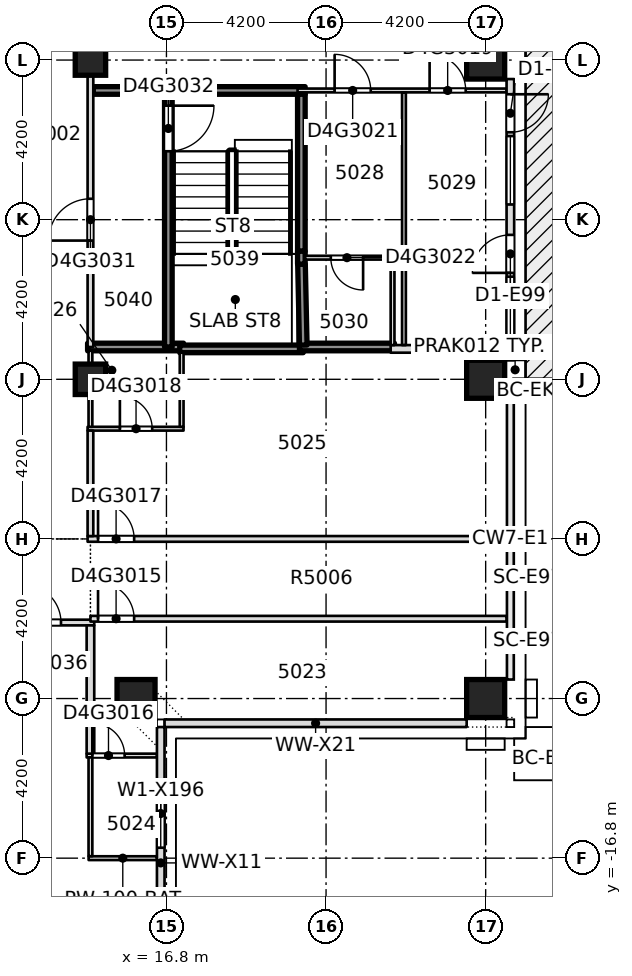
"""IFC4 building model, lengths in metres.
Left out: names, types, materials, properties, quantities, classifications, styles, units other than length and angle.
Written with IfcOpenShell. Run it as: python <this file> out.ifc"""

import sys

from ifc_helpers import new_model, si_unit, direction, frame, frame_2d, origin, origin_2d, place, context, subcontext, project, spatial, rectangle, extrude, element, fill, save


model = new_model("IFC4")
c1 = context("Model", 3, precision=1e-05, world=origin(), true_north=direction((0.0, 1.0)))
c2 = subcontext(c1, "Body", "Model", "MODEL_VIEW")
j1 = project(units=[si_unit("LENGTHUNIT", "METRE"), si_unit("PLANEANGLEUNIT", "RADIAN")], contexts=[c1])
p1 = place(None, origin())
s1 = spatial("IfcSite", under=j1, at=p1, CompositionType="ELEMENT")
p2 = place(p1, origin())
s2 = spatial("IfcBuilding", under=s1, at=p2, CompositionType="ELEMENT")
p3 = place(p2, frame((0.0, 0.0, 192.8)))
s3 = spatial("IfcBuildingStorey", under=s2, at=p3, CompositionType="ELEMENT", Elevation=192.8)
for number, where, z_axis, x_axis in (
    (1, (16.0, -12.6, -0.4), (0.0, 0.0, 1.0), (1.0, 0.0, 0.0)),
    (2, (25.2, -12.6, -0.4), (0.0, 0.0, 1.0), (1.0, 0.0, 0.0)),
    (3, (25.2, -4.2, -0.4), (0.0, 0.0, 1.0), (1.0, 0.0, 0.0)),
    (4, (25.2, 4.2, -0.4), (0.0, 0.0, 1.0), (1.0, 0.0, 0.0)),
):
    element("IfcColumn", number, at=place(p3, frame(where, z_axis=z_axis, x_axis=x_axis)), inside=s3, PredefinedType="COLUMN", context=c2, shape_type="SweptSolid", body=[
        extrude(rectangle(XDim=1.0, YDim=1.0, at=origin_2d()), origin(), (0.0, 0.0, 1.0), 3.45),
    ])
for number, where, z_axis, x_axis in (
    (5, (14.8, -4.2, -0.4), (0.0, 0.0, 1.0), (1.0, 0.0, 0.0)),
    (6, (14.8, 4.2, -0.4), (0.0, 0.0, 1.0), (1.0, 0.0, 0.0)),
):
    element("IfcColumn", number, at=place(p3, frame(where, z_axis=z_axis, x_axis=x_axis)), inside=s3, PredefinedType="COLUMN", context=c2, shape_type="SweptSolid", body=[
        extrude(rectangle(XDim=0.8, YDim=0.8, at=origin_2d()), origin(), (0.0, 0.0, 1.0), 3.45),
    ])
p4 = place(p3, frame((14.752, -16.8, 0.0), z_axis=(0.0, 0.0, 1.0), x_axis=(1.0, 0.0, 0.0)))
e7 = element("IfcWall", 7, at=p4, inside=s3, PredefinedType="PARTITIONING", context=c2, shape_type="SweptSolid", body=[
    extrude(rectangle(XDim=1.798, YDim=0.1, at=frame_2d((0.899, 0.0))), origin(), (0.0, 0.0, 1.0), 3.05),
])
p5 = place(p3, frame((14.7, -14.1, 0.0), z_axis=(0.0, 0.0, 1.0), x_axis=(1.0, 0.0, 0.0)))
e8 = element("IfcWall", 8, at=p5, inside=s3, PredefinedType="PARTITIONING", context=c2, shape_type="SweptSolid", body=[
    extrude(rectangle(XDim=1.85, YDim=0.1, at=frame_2d((0.925, 0.0))), origin(), (0.0, 0.0, 1.0), 3.05),
])
p6 = place(p5, frame((0.15, 0.0, 0.0)))
e9 = element("IfcOpeningElement", 9, at=p6, cuts=e8, PredefinedType="OPENING", context=c2, shape_type="SweptSolid", body=[
    extrude(rectangle(XDim=0.85, YDim=2.1, at=frame_2d((0.425, 1.05))), frame((0.0, 0.06, 0.0), z_axis=(0.0, -1.0, 0.0), x_axis=(1.0, 0.0, 0.0)), (0.0, 0.0, 1.0), 0.12),
])
p7 = place(p3, frame((3.9, -10.6, 0.0), z_axis=(0.0, 0.0, 1.0), x_axis=(1.0, 0.0, 0.0)))
e10 = element("IfcWall", 10, at=p7, inside=s3, PredefinedType="PARTITIONING", context=c2, shape_type="SweptSolid", body=[
    extrude(rectangle(XDim=11.0, YDim=0.15, at=frame_2d((5.5, 0.0))), origin(), (0.0, 0.0, 1.0), 3.05),
])
p8 = place(p7, frame((1.875, 0.0, 0.0)))
e11 = element("IfcOpeningElement", 11, at=p8, cuts=e10, PredefinedType="OPENING", context=c2, shape_type="SweptSolid", body=[
    extrude(rectangle(XDim=0.95, YDim=2.1, at=frame_2d((0.475, 1.05))), frame((0.0, 0.085, 0.0), z_axis=(0.0, -1.0, 0.0), x_axis=(1.0, 0.0, 0.0)), (0.0, 0.0, 1.0), 0.17),
])
p9 = place(p7, frame((5.95, 0.0, 0.0)))
e12 = element("IfcOpeningElement", 12, at=p9, cuts=e10, PredefinedType="OPENING", context=c2, shape_type="SweptSolid", body=[
    extrude(rectangle(XDim=1.1, YDim=2.1, at=frame_2d((0.55, 1.05))), frame((0.0, 0.085, 0.0), z_axis=(0.0, -1.0, 0.0), x_axis=(1.0, 0.0, 0.0)), (0.0, 0.0, 1.0), 0.17),
])
p10 = place(p7, frame((9.125, 0.0, 0.0)))
e13 = element("IfcOpeningElement", 13, at=p10, cuts=e10, PredefinedType="OPENING", context=c2, shape_type="SweptSolid", body=[
    extrude(rectangle(XDim=1.0, YDim=2.1, at=frame_2d((0.5, 1.05))), frame((0.0, 0.085, 0.0), z_axis=(0.0, -1.0, 0.0), x_axis=(1.0, 0.0, 0.0)), (0.0, 0.0, 1.0), 0.17),
])
p11 = place(p3, frame((14.8, -10.5, 0.0), z_axis=(0.0, 0.0, 1.0), x_axis=(1.0, 0.0, 0.0)))
e14 = element("IfcWall", 14, at=p11, inside=s3, PredefinedType="PARTITIONING", context=c2, shape_type="SweptSolid", body=[
    extrude(rectangle(XDim=10.95, YDim=0.15, at=frame_2d((5.475, 0.0))), origin(), (0.0, 0.0, 1.0), 3.05),
])
p12 = place(p11, frame((0.2, 0.0, 0.0)))
e15 = element("IfcOpeningElement", 15, at=p12, cuts=e14, PredefinedType="OPENING", context=c2, shape_type="SweptSolid", body=[
    extrude(rectangle(XDim=0.95, YDim=2.1, at=frame_2d((0.475, 1.05))), frame((0.0, 0.085, 0.0), z_axis=(0.0, -1.0, 0.0), x_axis=(1.0, 0.0, 0.0)), (0.0, 0.0, 1.0), 0.17),
])
p13 = place(p3, frame((14.725, -8.4, 0.0), z_axis=(0.0, 0.0, 1.0), x_axis=(1.0, 0.0, 0.0)))
e16 = element("IfcWall", 16, at=p13, inside=s3, PredefinedType="PARTITIONING", context=c2, shape_type="SweptSolid", body=[
    extrude(rectangle(XDim=11.025, YDim=0.15, at=frame_2d((5.512, 0.0))), origin(), (0.0, 0.0, 1.0), 3.05),
])
p14 = place(p13, frame((0.275, 0.0, 0.0)))
e17 = element("IfcOpeningElement", 17, at=p14, cuts=e16, PredefinedType="OPENING", context=c2, shape_type="SweptSolid", body=[
    extrude(rectangle(XDim=0.95, YDim=2.1, at=frame_2d((0.475, 1.05))), frame((0.0, 0.085, 0.0), z_axis=(0.0, -1.0, 0.0), x_axis=(1.0, 0.0, 0.0)), (0.0, 0.0, 1.0), 0.17),
])
p15 = place(p3, frame((14.725, -5.5, 0.0), z_axis=(0.0, 0.0, 1.0), x_axis=(1.0, 0.0, 0.0)))
e18 = element("IfcWall", 18, at=p15, inside=s3, PredefinedType="PARTITIONING", context=c2, shape_type="SweptSolid", body=[
    extrude(rectangle(XDim=2.525, YDim=0.1, at=frame_2d((1.262, 0.0))), origin(), (0.0, 0.0, 1.0), 3.05),
])
p16 = place(p15, frame((0.85, 0.0, 0.0)))
e19 = element("IfcOpeningElement", 19, at=p16, cuts=e18, PredefinedType="OPENING", context=c2, shape_type="SweptSolid", body=[
    extrude(rectangle(XDim=0.85, YDim=2.1, at=frame_2d((0.425, 1.05))), frame((0.0, 0.06, 0.0), z_axis=(0.0, -1.0, 0.0), x_axis=(1.0, 0.0, 0.0)), (0.0, 0.0, 1.0), 0.12),
])
p17 = place(p3, frame((14.725, -3.35, 0.0), z_axis=(0.0, 0.0, 1.0), x_axis=(1.0, 0.0, 0.0)))
e20 = element("IfcWall", 20, at=p17, inside=s3, PredefinedType="SOLIDWALL", context=c2, shape_type="SweptSolid", body=[
    extrude(rectangle(XDim=2.525, YDim=0.2, at=frame_2d((1.262, 0.0))), origin(), (0.0, 0.0, 1.0), 3.05),
])
p18 = place(p3, frame((17.15, -3.4, 0.0), z_axis=(0.0, 0.0, 1.0), x_axis=(1.0, 0.0, 0.0)))
e21 = element("IfcWall", 21, at=p18, inside=s3, PredefinedType="SOLIDWALL", context=c2, shape_type="SweptSolid", body=[
    extrude(rectangle(XDim=3.25, YDim=0.2, at=frame_2d((1.625, 0.0))), origin(), (0.0, 0.0, 1.0), 3.05),
])
p19 = place(p3, frame((20.3, -3.35, 0.0), z_axis=(0.0, 0.0, 1.0), x_axis=(1.0, 0.0, 0.0)))
e22 = element("IfcWall", 22, at=p19, inside=s3, PredefinedType="SOLIDWALL", context=c2, shape_type="SweptSolid", body=[
    extrude(rectangle(XDim=2.5, YDim=0.2, at=frame_2d((1.25, 0.0))), origin(), (0.0, 0.0, 1.0), 3.05),
])
p20 = place(p3, frame((22.7, -3.4, 0.0), z_axis=(0.0, 0.0, 1.0), x_axis=(1.0, 0.0, 0.0)))
e23 = element("IfcWall", 23, at=p20, inside=s3, PredefinedType="PARTITIONING", context=c2, shape_type="SweptSolid", body=[
    extrude(rectangle(XDim=3.05, YDim=0.2, at=frame_2d((1.525, 0.0))), origin(), (0.0, 0.0, 1.0), 3.05),
])
p21 = place(p3, frame((20.45, -1.0, 0.0), z_axis=(0.0, 0.0, 1.0), x_axis=(1.0, 0.0, 0.0)))
e24 = element("IfcWall", 24, at=p21, inside=s3, PredefinedType="PARTITIONING", context=c2, shape_type="SweptSolid", body=[
    extrude(rectangle(XDim=2.35, YDim=0.1, at=frame_2d((1.175, 0.0))), origin(), (0.0, 0.0, 1.0), 3.05),
])
p22 = place(p21, frame((0.675, 0.0, 0.0)))
e25 = element("IfcOpeningElement", 25, at=p22, cuts=e24, PredefinedType="OPENING", context=c2, shape_type="SweptSolid", body=[
    extrude(rectangle(XDim=0.85, YDim=2.1, at=frame_2d((0.425, 1.05))), frame((0.0, 0.06, 0.0), z_axis=(0.0, -1.0, 0.0), x_axis=(1.0, 0.0, 0.0)), (0.0, 0.0, 1.0), 0.12),
])
p23 = place(p3, frame((14.875, 3.4, 0.0), z_axis=(0.0, 0.0, 1.0), x_axis=(1.0, 0.0, 0.0)))
e26 = element("IfcWall", 26, at=p23, inside=s3, PredefinedType="SOLIDWALL", context=c2, shape_type="SweptSolid", body=[
    extrude(rectangle(XDim=5.575, YDim=0.2, at=frame_2d((2.788, 0.0))), origin(), (0.0, 0.0, 1.0), 3.05),
])
p24 = place(p3, frame((20.25, 3.4, 0.0), z_axis=(0.0, 0.0, 1.0), x_axis=(1.0, 0.0, 0.0)))
e27 = element("IfcWall", 27, at=p24, inside=s3, PredefinedType="PARTITIONING", context=c2, shape_type="SweptSolid", body=[
    extrude(rectangle(XDim=5.5, YDim=0.1, at=frame_2d((2.75, 0.0))), origin(), (0.0, 0.0, 1.0), 3.05),
])
p25 = place(p24, frame((3.475, 0.0, 0.0)))
e28 = element("IfcOpeningElement", 28, at=p25, cuts=e27, PredefinedType="OPENING", context=c2, shape_type="SweptSolid", body=[
    extrude(rectangle(XDim=0.95, YDim=2.1, at=frame_2d((0.475, 1.05))), frame((0.0, 0.06, 0.0), z_axis=(0.0, -1.0, 0.0), x_axis=(1.0, 0.0, 0.0)), (0.0, 0.0, 1.0), 0.12),
])
p26 = place(p24, frame((0.975, 0.0, 0.0)))
e29 = element("IfcOpeningElement", 29, at=p26, cuts=e27, PredefinedType="OPENING", context=c2, shape_type="SweptSolid", body=[
    extrude(rectangle(XDim=0.95, YDim=2.1, at=frame_2d((0.475, 1.05))), frame((0.0, 0.06, 0.0), z_axis=(0.0, -1.0, 0.0), x_axis=(1.0, 0.0, 0.0)), (0.0, 0.0, 1.0), 0.12),
])
p27 = place(p3, frame((14.8, -16.748, 0.0), z_axis=(0.0, 0.0, 1.0), x_axis=(0.0, 1.0, 0.0)))
e30 = element("IfcWall", 30, at=p27, inside=s3, PredefinedType="PARTITIONING", context=c2, shape_type="SweptSolid", body=[
    extrude(rectangle(XDim=2.598, YDim=0.1, at=frame_2d((1.299, 0.0))), origin(), (0.0, 0.0, 1.0), 3.05),
])
p28 = place(p3, frame((14.8, -14.05, 0.0), z_axis=(0.0, 0.0, 1.0), x_axis=(0.0, 1.0, 0.0)))
e31 = element("IfcWall", 31, at=p28, inside=s3, PredefinedType="PARTITIONING", context=c2, shape_type="SweptSolid", body=[
    extrude(rectangle(XDim=3.375, YDim=0.2, at=frame_2d((1.688, 0.0))), origin(), (0.0, 0.0, 1.0), 3.05),
])
p29 = place(p3, frame((14.8, -8.325, 0.0), z_axis=(0.0, 0.0, 1.0), x_axis=(0.0, 1.0, 0.0)))
e32 = element("IfcWall", 32, at=p29, inside=s3, PredefinedType="PARTITIONING", context=c2, shape_type="SweptSolid", body=[
    extrude(rectangle(XDim=2.775, YDim=0.15, at=frame_2d((1.387, 0.0))), origin(), (0.0, 0.0, 1.0), 3.05),
])
p30 = place(p3, frame((14.8, -5.45, 0.0), z_axis=(0.0, 0.0, 1.0), x_axis=(0.0, 1.0, 0.0)))
e33 = element("IfcWall", 33, at=p30, inside=s3, PredefinedType="PARTITIONING", context=c2, shape_type="SweptSolid", body=[
    extrude(rectangle(XDim=2.0, YDim=0.1, at=frame_2d((1.0, 0.0))), origin(), (0.0, 0.0, 1.0), 3.05),
])
p31 = place(p3, frame((14.8, -3.35, 0.0), z_axis=(0.0, 0.0, 1.0), x_axis=(0.0, 1.0, 0.0)))
e34 = element("IfcWall", 34, at=p31, inside=s3, PredefinedType="PARTITIONING", context=c2, shape_type="SweptSolid", body=[
    extrude(rectangle(XDim=11.675, YDim=0.15, at=frame_2d((5.837, 0.0))), origin(), (0.0, 0.0, 1.0), 3.05),
])
p32 = place(p31, frame((2.8, 0.0, 0.0)))
e35 = element("IfcOpeningElement", 35, at=p32, cuts=e34, PredefinedType="OPENING", context=c2, shape_type="SweptSolid", body=[
    extrude(rectangle(XDim=1.1, YDim=2.1, at=frame_2d((0.55, 1.05))), frame((0.0, 0.085, 0.0), z_axis=(0.0, -1.0, 0.0), x_axis=(1.0, 0.0, 0.0)), (0.0, 0.0, 1.0), 0.17),
])
p33 = place(p3, frame((16.85, -3.35, 0.0), z_axis=(0.0, 0.0, 1.0), x_axis=(0.0, 1.0, 0.0)))
e36 = element("IfcWall", 36, at=p33, inside=s3, PredefinedType="SOLIDWALL", context=c2, shape_type="SweptSolid", body=[
    extrude(rectangle(XDim=6.65, YDim=0.2, at=frame_2d((3.325, 0.0))), origin(), (0.0, 0.0, 1.0), 3.05),
])
p34 = place(p33, frame((5.15, 0.0, 0.0)))
e37 = element("IfcOpeningElement", 37, at=p34, cuts=e36, PredefinedType="OPENING", context=c2, shape_type="SweptSolid", body=[
    extrude(rectangle(XDim=1.2, YDim=2.1, at=frame_2d((0.6, 1.05))), frame((0.0, 0.11, 0.0), z_axis=(0.0, -1.0, 0.0), x_axis=(1.0, 0.0, 0.0)), (0.0, 0.0, 1.0), 0.22),
])
p35 = place(p3, frame((17.2, -5.45, 0.0), z_axis=(0.0, 0.0, 1.0), x_axis=(0.0, 1.0, 0.0)))
e38 = element("IfcWall", 38, at=p35, inside=s3, PredefinedType="PARTITIONING", context=c2, shape_type="SweptSolid", body=[
    extrude(rectangle(XDim=1.95, YDim=0.1, at=frame_2d((0.975, 0.0))), origin(), (0.0, 0.0, 1.0), 3.05),
])
p36 = place(p3, frame((20.4, -3.3, 0.0), z_axis=(0.0, 0.0, 1.0), x_axis=(-0.021771342749, 0.999762976227, 0.0)))
e39 = element("IfcWall", 39, at=p36, inside=s3, PredefinedType="SOLIDWALL", context=c2, shape_type="SweptSolid", body=[
    extrude(rectangle(XDim=2.131, YDim=0.2, at=frame_2d((1.065, 0.0))), origin(), (0.0, 0.0, 1.0), 3.05),
])
p37 = place(p3, frame((20.35, -0.83, 0.0), z_axis=(0.0, 0.0, 1.0), x_axis=(0.0, 1.0, 0.0)))
e40 = element("IfcWall", 40, at=p37, inside=s3, PredefinedType="SOLIDWALL", context=c2, shape_type="SweptSolid", body=[
    extrude(rectangle(XDim=4.13, YDim=0.2, at=frame_2d((2.065, 0.0))), origin(), (0.0, 0.0, 1.0), 3.05),
])
p38 = place(p3, frame((22.75, -3.3, 0.0), z_axis=(0.0, 0.0, 1.0), x_axis=(0.0, 1.0, 0.0)))
e41 = element("IfcWall", 41, at=p38, inside=s3, PredefinedType="PARTITIONING", context=c2, shape_type="SweptSolid", body=[
    extrude(rectangle(XDim=2.25, YDim=0.1, at=frame_2d((1.125, 0.0))), origin(), (0.0, 0.0, 1.0), 3.05),
])
p39 = place(p3, frame((23.05, -3.3, 0.0), z_axis=(0.0, 0.0, 1.0), x_axis=(0.0, 1.0, 0.0)))
e42 = element("IfcWall", 42, at=p39, inside=s3, PredefinedType="PARTITIONING", context=c2, shape_type="SweptSolid", body=[
    extrude(rectangle(XDim=6.65, YDim=0.1, at=frame_2d((3.325, 0.0))), origin(), (0.0, 0.0, 1.0), 3.05),
])
p40 = place(p3, frame((16.65, -20.5, 0.0), z_axis=(0.0, 0.0, 1.0), x_axis=(0.0, 1.0, 0.0)))
e43 = element("IfcWall", 43, at=p40, inside=s3, PredefinedType="STANDARD", context=c2, shape_type="SweptSolid", body=[
    extrude(rectangle(XDim=7.15, YDim=0.2, at=frame_2d((3.575, 0.0))), origin(), (0.0, 0.0, 1.0), 3.05),
])
p41 = place(p40, frame((0.4, 0.0, 0.2)))
e44 = element("IfcOpeningElement", 44, at=p41, cuts=e43, PredefinedType="OPENING", context=c2, shape_type="SweptSolid", body=[
    extrude(rectangle(XDim=1.8, YDim=2.65, at=frame_2d((0.9, 1.325))), frame((0.0, 0.11, 0.0), z_axis=(0.0, -1.0, 0.0), x_axis=(1.0, 0.0, 0.0)), (0.0, 0.0, 1.0), 0.22),
])
p42 = place(p40, frame((3.975, 0.0, 0.2)))
e45 = element("IfcOpeningElement", 45, at=p42, cuts=e43, PredefinedType="OPENING", context=c2, shape_type="SweptSolid", body=[
    extrude(rectangle(XDim=1.8, YDim=2.65, at=frame_2d((0.9, 1.325))), frame((0.0, 0.11, 0.0), z_axis=(0.0, -1.0, 0.0), x_axis=(1.0, 0.0, 0.0)), (0.0, 0.0, 1.0), 0.22),
])
p43 = place(p3, frame((16.75, -13.25, 0.0), z_axis=(0.0, 0.0, 1.0), x_axis=(1.0, 0.0, 0.0)))
e46 = element("IfcWall", 46, at=p43, inside=s3, PredefinedType="STANDARD", context=c2, shape_type="SweptSolid", body=[
    extrude(rectangle(XDim=7.95, YDim=0.2, at=frame_2d((3.975, 0.0))), origin(), (0.0, 0.0, 1.0), 3.05),
])
p44 = place(p3, frame((25.85, -3.7, 0.0), z_axis=(0.0, 0.0, 1.0), x_axis=(0.0, 1.0, 0.0)))
e47 = element("IfcWall", 47, at=p44, inside=s3, PredefinedType="STANDARD", context=c2, shape_type="SweptSolid", body=[
    extrude(rectangle(XDim=7.4, YDim=0.2, at=frame_2d((3.7, 0.0))), origin(), (0.0, 0.0, 1.0), 3.05),
])
p45 = place(p44, frame((0.4, 0.0, 0.2)))
e48 = element("IfcOpeningElement", 48, at=p45, cuts=e47, PredefinedType="OPENING", context=c2, shape_type="SweptSolid", body=[
    extrude(rectangle(XDim=1.8, YDim=2.65, at=frame_2d((0.9, 1.325))), frame((0.0, 0.11, 0.0), z_axis=(0.0, -1.0, 0.0), x_axis=(1.0, 0.0, 0.0)), (0.0, 0.0, 1.0), 0.22),
])
p46 = place(p44, frame((2.3, 0.0, 0.0)))
e49 = element("IfcOpeningElement", 49, at=p46, cuts=e47, PredefinedType="OPENING", context=c2, shape_type="SweptSolid", body=[
    extrude(rectangle(XDim=1.0, YDim=2.4, at=frame_2d((0.5, 1.2))), frame((0.0, 0.11, 0.0), z_axis=(0.0, -1.0, 0.0), x_axis=(1.0, 0.0, 0.0)), (0.0, 0.0, 1.0), 0.22),
])
p47 = place(p44, frame((4.1, 0.0, 0.2)))
e50 = element("IfcOpeningElement", 50, at=p47, cuts=e47, PredefinedType="OPENING", context=c2, shape_type="SweptSolid", body=[
    extrude(rectangle(XDim=1.8, YDim=2.65, at=frame_2d((0.9, 1.325))), frame((0.0, 0.11, 0.0), z_axis=(0.0, -1.0, 0.0), x_axis=(1.0, 0.0, 0.0)), (0.0, 0.0, 1.0), 0.22),
])
p48 = place(p44, frame((6.0, 0.0, 0.0)))
e51 = element("IfcOpeningElement", 51, at=p48, cuts=e47, PredefinedType="OPENING", context=c2, shape_type="SweptSolid", body=[
    extrude(rectangle(XDim=1.0, YDim=2.4, at=frame_2d((0.5, 1.2))), frame((0.0, 0.11, 0.0), z_axis=(0.0, -1.0, 0.0), x_axis=(1.0, 0.0, 0.0)), (0.0, 0.0, 1.0), 0.22),
])
p49 = place(p3, frame((20.35, -1.17, 0.0), z_axis=(0.0, 0.0, 1.0), x_axis=(0.0, 1.0, 0.0)))
e52 = element("IfcWall", 52, at=p49, inside=s3, PredefinedType="SOLIDWALL", context=c2, shape_type="SweptSolid", body=[
    extrude(rectangle(XDim=0.34, YDim=0.2, at=frame_2d((0.17, 0.0))), origin(), (0.0, 0.0, 1.0), 3.05),
])
p50 = place(p12, origin())
e53 = element("IfcDoor", 53, at=p50, inside=s3, OperationType="SINGLE_SWING_RIGHT", PredefinedType="DOOR", context=c2, shape_type="SweptSolid", body=[
    extrude(rectangle(XDim=0.95, YDim=2.1, at=frame_2d((0.475, 1.05))), frame((0.0, 0.025, 0.0), z_axis=(0.0, -1.0, 0.0), x_axis=(1.0, 0.0, 0.0)), (0.0, 0.0, 1.0), 0.05),
])
fill(e15, e53)
p51 = place(p6, origin())
e54 = element("IfcDoor", 54, at=p51, inside=s3, OperationType="SINGLE_SWING_RIGHT", PredefinedType="DOOR", context=c2, shape_type="SweptSolid", body=[
    extrude(rectangle(XDim=0.85, YDim=2.1, at=frame_2d((0.425, 1.05))), frame((0.0, 0.025, 0.0), z_axis=(0.0, -1.0, 0.0), x_axis=(1.0, 0.0, 0.0)), (0.0, 0.0, 1.0), 0.05),
])
fill(e9, e54)
p52 = place(p14, origin())
e55 = element("IfcDoor", 55, at=p52, inside=s3, OperationType="SINGLE_SWING_LEFT", PredefinedType="DOOR", context=c2, shape_type="SweptSolid", body=[
    extrude(rectangle(XDim=0.95, YDim=2.1, at=frame_2d((0.475, 1.05))), frame((0.0, 0.025, 0.0), z_axis=(0.0, -1.0, 0.0), x_axis=(1.0, 0.0, 0.0)), (0.0, 0.0, 1.0), 0.05),
])
fill(e17, e55)
p53 = place(p16, origin())
e56 = element("IfcDoor", 56, at=p53, inside=s3, OperationType="SINGLE_SWING_LEFT", PredefinedType="DOOR", context=c2, shape_type="SweptSolid", body=[
    extrude(rectangle(XDim=0.85, YDim=2.1, at=frame_2d((0.425, 1.05))), frame((0.0, 0.025, 0.0), z_axis=(0.0, -1.0, 0.0), x_axis=(1.0, 0.0, 0.0)), (0.0, 0.0, 1.0), 0.05),
])
fill(e19, e56)
p54 = place(p25, origin())
e57 = element("IfcDoor", 57, at=p54, inside=s3, OperationType="SINGLE_SWING_RIGHT", PredefinedType="DOOR", context=c2, shape_type="SweptSolid", body=[
    extrude(rectangle(XDim=0.95, YDim=2.1, at=frame_2d((0.475, 1.05))), frame((0.0, 0.025, 0.0), z_axis=(0.0, -1.0, 0.0), x_axis=(1.0, 0.0, 0.0)), (0.0, 0.0, 1.0), 0.05),
])
fill(e28, e57)
p55 = place(p26, origin())
e58 = element("IfcDoor", 58, at=p55, inside=s3, OperationType="SINGLE_SWING_RIGHT", PredefinedType="DOOR", context=c2, shape_type="SweptSolid", body=[
    extrude(rectangle(XDim=0.95, YDim=2.1, at=frame_2d((0.475, 1.05))), frame((0.0, 0.025, 0.0), z_axis=(0.0, -1.0, 0.0), x_axis=(1.0, 0.0, 0.0)), (0.0, 0.0, 1.0), 0.05),
])
fill(e29, e58)
p56 = place(p22, origin())
e59 = element("IfcDoor", 59, at=p56, inside=s3, OperationType="SINGLE_SWING_RIGHT", PredefinedType="DOOR", context=c2, shape_type="SweptSolid", body=[
    extrude(rectangle(XDim=0.85, YDim=2.1, at=frame_2d((0.425, 1.05))), frame((0.0, 0.025, 0.0), z_axis=(0.0, -1.0, 0.0), x_axis=(1.0, 0.0, 0.0)), (0.0, 0.0, 1.0), 0.05),
])
fill(e25, e59)
p57 = place(p32, origin())
e60 = element("IfcDoor", 60, at=p57, inside=s3, OperationType="SINGLE_SWING_LEFT", PredefinedType="DOOR", context=c2, shape_type="SweptSolid", body=[
    extrude(rectangle(XDim=1.1, YDim=2.1, at=frame_2d((0.55, 1.05))), frame((0.0, 0.025, 0.0), z_axis=(0.0, -1.0, 0.0), x_axis=(1.0, 0.0, 0.0)), (0.0, 0.0, 1.0), 0.05),
])
fill(e35, e60)
p58 = place(p34, origin())
e61 = element("IfcDoor", 61, at=p58, inside=s3, OperationType="SINGLE_SWING_LEFT", PredefinedType="DOOR", context=c2, shape_type="SweptSolid", body=[
    extrude(rectangle(XDim=1.2, YDim=2.1, at=frame_2d((0.6, 1.05))), frame((0.0, 0.025, 0.0), z_axis=(0.0, -1.0, 0.0), x_axis=(1.0, 0.0, 0.0)), (0.0, 0.0, 1.0), 0.05),
])
fill(e37, e61)
p59 = place(p10, origin())
e62 = element("IfcDoor", 62, at=p59, inside=s3, OperationType="SINGLE_SWING_LEFT", PredefinedType="DOOR", context=c2, shape_type="SweptSolid", body=[
    extrude(rectangle(XDim=1.0, YDim=2.1, at=frame_2d((0.5, 1.05))), frame((0.0, 0.025, 0.0), z_axis=(0.0, -1.0, 0.0), x_axis=(1.0, 0.0, 0.0)), (0.0, 0.0, 1.0), 0.05),
])
fill(e13, e62)
p60 = place(p42, origin())
e63 = element("IfcWindow", 63, at=p60, inside=s3, PartitioningType="SINGLE_PANEL", PredefinedType="WINDOW", context=c2, shape_type="SweptSolid", body=[
    extrude(rectangle(XDim=1.8, YDim=2.65, at=frame_2d((0.9, 1.325))), frame((0.0, 0.03, 0.0), z_axis=(0.0, -1.0, 0.0), x_axis=(1.0, 0.0, 0.0)), (0.0, 0.0, 1.0), 0.06),
])
fill(e45, e63)
p61 = place(p45, origin())
e64 = element("IfcWindow", 64, at=p61, inside=s3, PartitioningType="SINGLE_PANEL", PredefinedType="WINDOW", context=c2, shape_type="SweptSolid", body=[
    extrude(rectangle(XDim=1.8, YDim=2.65, at=frame_2d((0.9, 1.325))), frame((0.0, 0.03, 0.0), z_axis=(0.0, -1.0, 0.0), x_axis=(1.0, 0.0, 0.0)), (0.0, 0.0, 1.0), 0.06),
])
fill(e48, e64)
p62 = place(p46, origin())
e65 = element("IfcDoor", 65, at=p62, inside=s3, OperationType="SINGLE_SWING_LEFT", PredefinedType="DOOR", context=c2, shape_type="SweptSolid", body=[
    extrude(rectangle(XDim=1.0, YDim=2.4, at=frame_2d((0.5, 1.2))), frame((0.0, 0.025, 0.0), z_axis=(0.0, -1.0, 0.0), x_axis=(1.0, 0.0, 0.0)), (0.0, 0.0, 1.0), 0.05),
])
fill(e49, e65)
p63 = place(p47, origin())
e66 = element("IfcWindow", 66, at=p63, inside=s3, PartitioningType="SINGLE_PANEL", PredefinedType="WINDOW", context=c2, shape_type="SweptSolid", body=[
    extrude(rectangle(XDim=1.8, YDim=2.65, at=frame_2d((0.9, 1.325))), frame((0.0, 0.03, 0.0), z_axis=(0.0, -1.0, 0.0), x_axis=(1.0, 0.0, 0.0)), (0.0, 0.0, 1.0), 0.06),
])
fill(e50, e66)
p64 = place(p48, origin())
e67 = element("IfcDoor", 67, at=p64, inside=s3, OperationType="SINGLE_SWING_LEFT", PredefinedType="DOOR", context=c2, shape_type="SweptSolid", body=[
    extrude(rectangle(XDim=1.0, YDim=2.4, at=frame_2d((0.5, 1.2))), frame((0.0, 0.025, 0.0), z_axis=(0.0, -1.0, 0.0), x_axis=(1.0, 0.0, 0.0)), (0.0, 0.0, 1.0), 0.05),
])
fill(e51, e67)
save(model, sys.argv[1])
